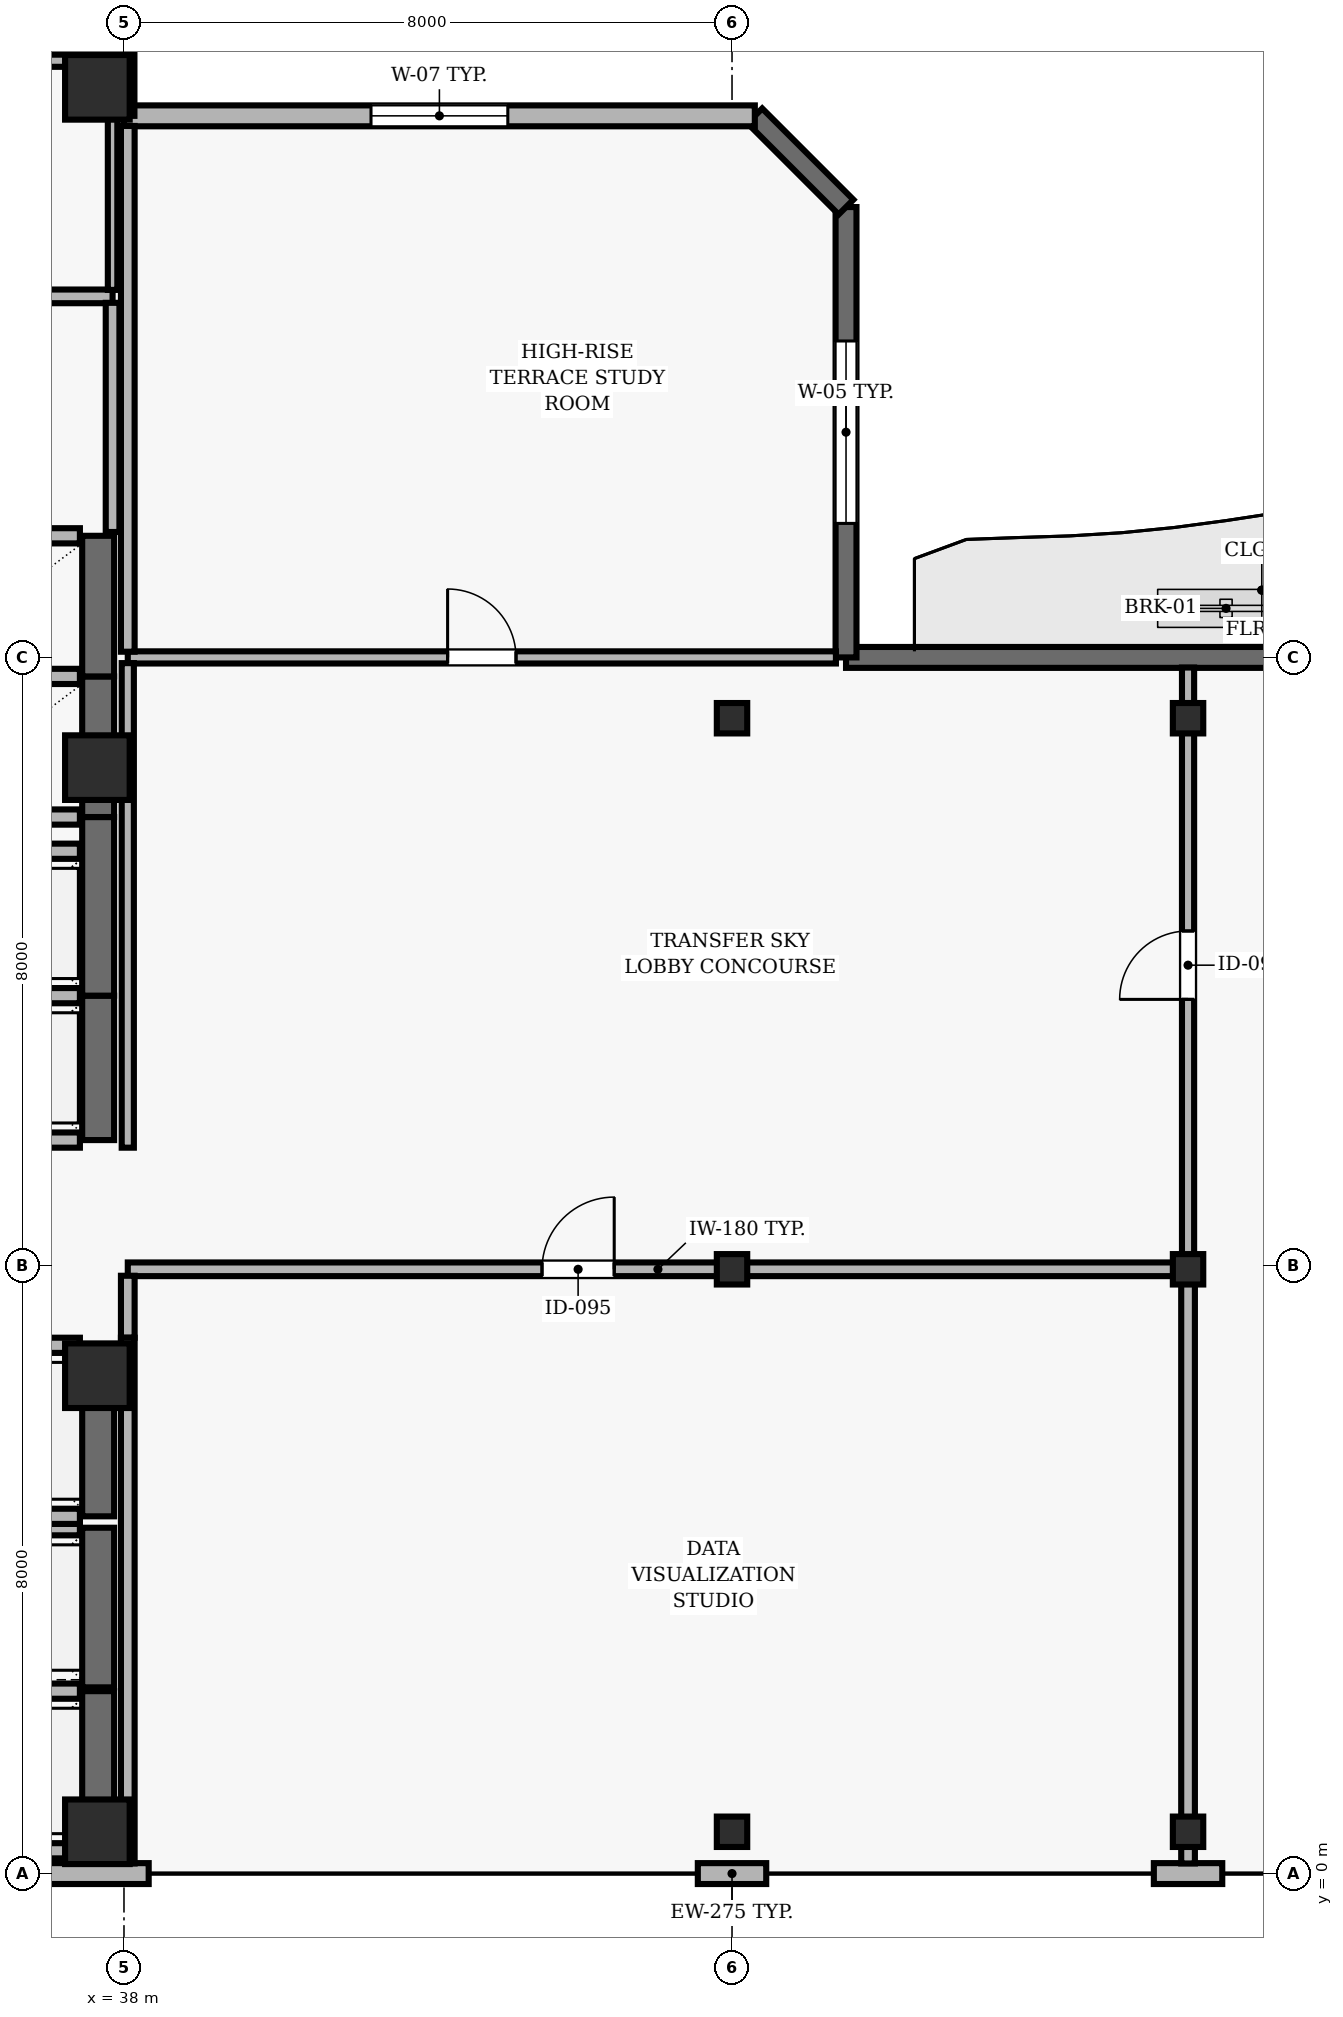
"""IFC4 building model, lengths in metres.
Left out: names, types, materials, properties, quantities, classifications, styles, units other than length and angle.
Written with IfcOpenShell. Run it as: python <this file> out.ifc"""

import sys

from ifc_helpers import new_model, si_unit, direction, frame, frame_2d, origin, origin_2d, place, context, subcontext, project, spatial, rectangle, hollow_rectangle, extrude, element, fill, save


model = new_model("IFC4")
c1 = context("Model", 3, precision=1e-05, world=origin(), true_north=direction((0.0, 1.0)))
c2 = subcontext(c1, "Body", "Model", "MODEL_VIEW")
j1 = project(units=[si_unit("LENGTHUNIT", "METRE"), si_unit("PLANEANGLEUNIT", "RADIAN")], contexts=[c1])
p1 = place(None, origin())
s1 = spatial("IfcSite", under=j1, at=p1, CompositionType="ELEMENT")
p2 = place(p1, origin())
s2 = spatial("IfcBuilding", under=s1, at=p2, CompositionType="ELEMENT")
p3 = place(p2, frame((0.0, 0.0, 243.2)))
s3 = spatial("IfcBuildingStorey", under=s2, at=p3, CompositionType="ELEMENT", Elevation=243.2)
for number, where, z_axis, x_axis in (
    (1, (37.65, 0.55, 0.0), (0.0, 0.0, 1.0), (1.0, 0.0, 0.0)),
    (2, (37.65, 6.55, 0.0), (0.0, 0.0, 1.0), (1.0, 0.0, 0.0)),
    (3, (37.65, 14.55, 0.0), (0.0, 0.0, 1.0), (1.0, 0.0, 0.0)),
    (4, (37.65, 23.5, 0.0), (0.0, 0.0, 1.0), (1.0, 0.0, 0.0)),
):
    element("IfcColumn", number, at=place(p3, frame(where, z_axis=z_axis, x_axis=x_axis)), inside=s3, PredefinedType="COLUMN", context=c2, shape_type="SweptSolid", body=[
        extrude(rectangle(XDim=0.85, YDim=0.85, at=origin_2d()), origin(), (0.0, 0.0, 1.0), 5.0),
    ])
for number, where, z_axis, x_axis in (
    (5, (46.0, 0.55, 0.0), (0.0, 0.0, 1.0), (1.0, 0.0, 0.0)),
    (6, (46.0, 7.95, 0.0), (0.0, 0.0, 1.0), (1.0, 0.0, 0.0)),
    (7, (46.0, 15.2, 0.0), (0.0, 0.0, 1.0), (1.0, 0.0, 0.0)),
    (8, (52.0, 0.55, 0.0), (0.0, 0.0, 1.0), (1.0, 0.0, 0.0)),
    (9, (52.0, 7.95, 0.0), (0.0, 0.0, 1.0), (1.0, 0.0, 0.0)),
    (10, (52.0, 15.2, 0.0), (0.0, 0.0, 1.0), (1.0, 0.0, 0.0)),
):
    element("IfcColumn", number, at=place(p3, frame(where, z_axis=z_axis, x_axis=x_axis)), inside=s3, PredefinedType="COLUMN", context=c2, shape_type="SweptSolid", body=[
        extrude(hollow_rectangle(XDim=0.4, YDim=0.4, WallThickness=0.02, at=origin_2d()), origin(), (0.0, 0.0, 1.0), 5.0),
    ])
p4 = place(p3, frame((36.975, 0.0, 0.0), z_axis=(0.0, 0.0, 1.0), x_axis=(1.0, 0.0, 0.0)))
e11 = element("IfcWall", 11, at=p4, inside=s3, PredefinedType="SOLIDWALL", context=c2, shape_type="SweptSolid", body=[
    extrude(rectangle(XDim=1.35, YDim=0.275, at=frame_2d((0.675, 0.0))), origin(), (0.0, 0.0, 1.0), 4.79),
])
for number, where, z_axis, x_axis in (
    (12, (45.55, 0.0, 0.0), (0.0, 0.0, 1.0), (1.0, 0.0, 0.0)),
    (13, (51.55, 0.0, 0.0), (0.0, 0.0, 1.0), (1.0, 0.0, 0.0)),
):
    element("IfcWall", number, at=place(p3, frame(where, z_axis=z_axis, x_axis=x_axis)), inside=s3, PredefinedType="SOLIDWALL", context=c2, shape_type="SweptSolid", body=[
        extrude(rectangle(XDim=0.9, YDim=0.275, at=frame_2d((0.45, 0.0))), origin(), (0.0, 0.0, 1.0), 4.79),
    ])
p5 = place(p3, frame((57.3, 16.0, 0.0), z_axis=(0.0, 0.0, 1.0), x_axis=(-1.0, 0.0, 0.0)))
e14 = element("IfcWall", 14, at=p5, inside=s3, PredefinedType="SOLIDWALL", context=c2, shape_type="SweptSolid", body=[
    extrude(rectangle(XDim=9.8, YDim=0.275, at=frame_2d((4.9, 0.0))), origin(), (0.0, 0.0, 1.0), 4.79),
])
p6 = place(p5, frame((2.1, 0.0, 0.0)))
e15 = element("IfcOpeningElement", 15, at=p6, cuts=e14, PredefinedType="OPENING", context=c2, shape_type="SweptSolid", body=[
    extrude(rectangle(XDim=1.0, YDim=2.2, at=frame_2d((0.5, 1.1))), frame((0.0, 0.147, 0.0), z_axis=(0.0, -1.0, 0.0), x_axis=(1.0, 0.0, 0.0)), (0.0, 0.0, 1.0), 0.295),
])
p7 = place(p3, frame((47.5, 16.0, 0.0), z_axis=(0.0, 0.0, 1.0), x_axis=(0.0, 1.0, 0.0)))
e16 = element("IfcWall", 16, at=p7, inside=s3, PredefinedType="SOLIDWALL", context=c2, shape_type="SweptSolid", body=[
    extrude(rectangle(XDim=5.925, YDim=0.275, at=frame_2d((2.962, 0.0))), origin(), (0.0, 0.0, 1.0), 4.79),
])
p8 = place(p7, frame((1.763, 0.0, 0.9)))
e17 = element("IfcOpeningElement", 17, at=p8, cuts=e16, PredefinedType="OPENING", context=c2, shape_type="SweptSolid", body=[
    extrude(rectangle(XDim=2.4, YDim=1.6, at=frame_2d((1.2, 0.8))), frame((0.0, 0.147, 0.0), z_axis=(0.0, -1.0, 0.0), x_axis=(1.0, 0.0, 0.0)), (0.0, 0.0, 1.0), 0.295),
])
p9 = place(p3, frame((47.5, 21.925, 0.0), z_axis=(0.0, 0.0, 1.0), x_axis=(-0.707106781187, 0.707106781187, 0.0)))
e18 = element("IfcWall", 18, at=p9, inside=s3, PredefinedType="SOLIDWALL", context=c2, shape_type="SweptSolid", body=[
    extrude(rectangle(XDim=1.697, YDim=0.275, at=frame_2d((0.849, 0.0))), origin(), (0.0, 0.0, 1.0), 4.79),
])
p10 = place(p3, frame((46.3, 23.125, 0.0), z_axis=(0.0, 0.0, 1.0), x_axis=(-1.0, 0.0, 0.0)))
e19 = element("IfcWall", 19, at=p10, inside=s3, PredefinedType="SOLIDWALL", context=c2, shape_type="SweptSolid", body=[
    extrude(rectangle(XDim=8.3, YDim=0.275, at=frame_2d((4.15, 0.0))), origin(), (0.0, 0.0, 1.0), 4.79),
])
p11 = place(p10, frame((3.25, 0.0, 0.9)))
e20 = element("IfcOpeningElement", 20, at=p11, cuts=e19, PredefinedType="OPENING", context=c2, shape_type="SweptSolid", body=[
    extrude(rectangle(XDim=1.8, YDim=1.8, at=frame_2d((0.9, 0.9))), frame((0.0, 0.147, 0.0), z_axis=(0.0, -1.0, 0.0), x_axis=(1.0, 0.0, 0.0)), (0.0, 0.0, 1.0), 0.295),
])
p12 = place(p3, frame((38.0, 23.125, 0.0), z_axis=(0.0, 0.0, 1.0), x_axis=(0.0, 1.0, 0.0)))
e21 = element("IfcWall", 21, at=p12, inside=s3, PredefinedType="SOLIDWALL", context=c2, shape_type="SweptSolid", body=[
    extrude(rectangle(XDim=12.175, YDim=0.275, at=frame_2d((6.087, 0.0))), origin(), (0.0, 0.0, 1.0), 4.79),
])
p13 = place(p12, frame((3.487, 0.0, 0.0)))
e22 = element("IfcOpeningElement", 22, at=p13, cuts=e21, PredefinedType="OPENING", context=c2, shape_type="SweptSolid", body=[
    extrude(rectangle(XDim=1.0, YDim=2.2, at=frame_2d((0.5, 1.1))), frame((0.0, 0.147, 0.0), z_axis=(0.0, -1.0, 0.0), x_axis=(1.0, 0.0, 0.0)), (0.0, 0.0, 1.0), 0.295),
])
p14 = place(p3, frame((37.66, 0.3, 0.0), z_axis=(0.0, 0.0, 1.0), x_axis=(0.0, 1.0, 0.0)))
e23 = element("IfcWall", 23, at=p14, inside=s3, PredefinedType="SHEAR", context=c2, shape_type="SweptSolid", body=[
    extrude(rectangle(XDim=2.1, YDim=0.42, at=frame_2d((1.05, 0.0))), origin(), (0.0, 0.0, 1.0), 4.79),
])
for number, where, z_axis, x_axis in (
    (24, (35.28, 0.3, 0.0), (0.0, 0.0, 1.0), (1.0, 0.0, 0.0)),
    (25, (37.42, 2.4, 0.0), (0.0, 0.0, 1.0), (-1.0, 0.0, 0.0)),
):
    element("IfcWall", number, at=place(p3, frame(where, z_axis=z_axis, x_axis=x_axis)), inside=s3, PredefinedType="SOLIDWALL", context=c2, shape_type="SweptSolid", body=[
        extrude(rectangle(XDim=2.14, YDim=0.2, at=frame_2d((1.07, 0.0))), origin(), (0.0, 0.0, 1.0), 4.79),
    ])
p15 = place(p3, frame((37.66, 2.45, 0.0), z_axis=(0.0, 0.0, 1.0), x_axis=(0.0, 1.0, 0.0)))
e26 = element("IfcWall", 26, at=p15, inside=s3, PredefinedType="SHEAR", context=c2, shape_type="SweptSolid", body=[
    extrude(rectangle(XDim=2.1, YDim=0.42, at=frame_2d((1.05, 0.0))), origin(), (0.0, 0.0, 1.0), 4.79),
])
p16 = place(p3, frame((37.42, 4.55, 0.0), z_axis=(0.0, 0.0, 1.0), x_axis=(-1.0, 0.0, 0.0)))
e27 = element("IfcWall", 27, at=p16, inside=s3, PredefinedType="SOLIDWALL", context=c2, shape_type="SweptSolid", body=[
    extrude(rectangle(XDim=2.14, YDim=0.2, at=frame_2d((1.07, 0.0))), origin(), (0.0, 0.0, 1.0), 4.79),
])
p17 = place(p3, frame((37.66, 4.7, 0.0), z_axis=(0.0, 0.0, 1.0), x_axis=(0.0, 1.0, 0.0)))
e28 = element("IfcWall", 28, at=p17, inside=s3, PredefinedType="SHEAR", context=c2, shape_type="SweptSolid", body=[
    extrude(rectangle(XDim=2.25, YDim=0.42, at=frame_2d((1.125, 0.0))), origin(), (0.0, 0.0, 1.0), 4.79),
])
for number, where, z_axis, x_axis in (
    (29, (35.28, 4.7, 0.0), (0.0, 0.0, 1.0), (1.0, 0.0, 0.0)),
    (30, (37.42, 6.95, 0.0), (0.0, 0.0, 1.0), (-1.0, 0.0, 0.0)),
):
    element("IfcWall", number, at=place(p3, frame(where, z_axis=z_axis, x_axis=x_axis)), inside=s3, PredefinedType="SOLIDWALL", context=c2, shape_type="SweptSolid", body=[
        extrude(rectangle(XDim=2.14, YDim=0.2, at=frame_2d((1.07, 0.0))), origin(), (0.0, 0.0, 1.0), 4.79),
    ])
p18 = place(p3, frame((37.66, 9.65, 0.0), z_axis=(0.0, 0.0, 1.0), x_axis=(0.0, 1.0, 0.0)))
e31 = element("IfcWall", 31, at=p18, inside=s3, PredefinedType="SHEAR", context=c2, shape_type="SweptSolid", body=[
    extrude(rectangle(XDim=1.9, YDim=0.42, at=frame_2d((0.95, 0.0))), origin(), (0.0, 0.0, 1.0), 4.79),
])
for number, where, z_axis, x_axis in (
    (32, (35.28, 9.65, 0.0), (0.0, 0.0, 1.0), (1.0, 0.0, 0.0)),
    (33, (37.42, 11.55, 0.0), (0.0, 0.0, 1.0), (-1.0, 0.0, 0.0)),
):
    element("IfcWall", number, at=place(p3, frame(where, z_axis=z_axis, x_axis=x_axis)), inside=s3, PredefinedType="SOLIDWALL", context=c2, shape_type="SweptSolid", body=[
        extrude(rectangle(XDim=2.14, YDim=0.2, at=frame_2d((1.07, 0.0))), origin(), (0.0, 0.0, 1.0), 4.79),
    ])
p19 = place(p3, frame((37.66, 11.55, 0.0), z_axis=(0.0, 0.0, 1.0), x_axis=(0.0, 1.0, 0.0)))
e34 = element("IfcWall", 34, at=p19, inside=s3, PredefinedType="SHEAR", context=c2, shape_type="SweptSolid", body=[
    extrude(rectangle(XDim=2.35, YDim=0.42, at=frame_2d((1.175, 0.0))), origin(), (0.0, 0.0, 1.0), 4.79),
])
p20 = place(p3, frame((37.42, 13.45, 0.0), z_axis=(0.0, 0.0, 1.0), x_axis=(-1.0, 0.0, 0.0)))
e35 = element("IfcWall", 35, at=p20, inside=s3, PredefinedType="SOLIDWALL", context=c2, shape_type="SweptSolid", body=[
    extrude(rectangle(XDim=2.14, YDim=0.2, at=frame_2d((1.07, 0.0))), origin(), (0.0, 0.0, 1.0), 4.79),
])
p21 = place(p3, frame((37.66, 13.9, 0.0), z_axis=(0.0, 0.0, 1.0), x_axis=(0.0, 1.0, 0.0)))
e36 = element("IfcWall", 36, at=p21, inside=s3, PredefinedType="SHEAR", context=c2, shape_type="SweptSolid", body=[
    extrude(rectangle(XDim=1.85, YDim=0.42, at=frame_2d((0.925, 0.0))), origin(), (0.0, 0.0, 1.0), 4.79),
])
for number, where, z_axis, x_axis in (
    (37, (35.28, 13.9, 0.0), (0.0, 0.0, 1.0), (1.0, 0.0, 0.0)),
    (38, (37.42, 15.75, 0.0), (0.0, 0.0, 1.0), (-1.0, 0.0, 0.0)),
):
    element("IfcWall", number, at=place(p3, frame(where, z_axis=z_axis, x_axis=x_axis)), inside=s3, PredefinedType="SOLIDWALL", context=c2, shape_type="SweptSolid", body=[
        extrude(rectangle(XDim=2.14, YDim=0.2, at=frame_2d((1.07, 0.0))), origin(), (0.0, 0.0, 1.0), 4.79),
    ])
p22 = place(p3, frame((37.66, 15.75, 0.0), z_axis=(0.0, 0.0, 1.0), x_axis=(0.0, 1.0, 0.0)))
e39 = element("IfcWall", 39, at=p22, inside=s3, PredefinedType="SHEAR", context=c2, shape_type="SweptSolid", body=[
    extrude(rectangle(XDim=1.85, YDim=0.42, at=frame_2d((0.925, 0.0))), origin(), (0.0, 0.0, 1.0), 4.79),
])
p23 = place(p3, frame((37.42, 17.6, 0.0), z_axis=(0.0, 0.0, 1.0), x_axis=(-1.0, 0.0, 0.0)))
e40 = element("IfcWall", 40, at=p23, inside=s3, PredefinedType="SOLIDWALL", context=c2, shape_type="SweptSolid", body=[
    extrude(rectangle(XDim=2.14, YDim=0.2, at=frame_2d((1.07, 0.0))), origin(), (0.0, 0.0, 1.0), 4.79),
])
p24 = place(p3, frame((37.85, 20.75, 0.0), z_axis=(0.0, 0.0, 1.0), x_axis=(-1.0, 0.0, 0.0)))
e41 = element("IfcWall", 41, at=p24, inside=s3, PredefinedType="PARTITIONING", context=c2, shape_type="SweptSolid", body=[
    extrude(rectangle(XDim=4.0, YDim=0.18, at=frame_2d((2.0, 0.0))), origin(), (0.0, 0.0, 1.0), 4.79),
])
p25 = place(p3, frame((37.85, 23.85, 0.0), z_axis=(0.0, 0.0, 1.0), x_axis=(-1.0, 0.0, 0.0)))
e42 = element("IfcWall", 42, at=p25, inside=s3, PredefinedType="PARTITIONING", context=c2, shape_type="SweptSolid", body=[
    extrude(rectangle(XDim=4.0, YDim=0.16, at=frame_2d((2.0, 0.0))), origin(), (0.0, 0.0, 1.0), 4.327),
])
p26 = place(p25, frame((1.9, 0.0, 0.0)))
e43 = element("IfcOpeningElement", 43, at=p26, cuts=e42, PredefinedType="OPENING", context=c2, shape_type="SweptSolid", body=[
    extrude(rectangle(XDim=0.9, YDim=2.1, at=frame_2d((0.45, 1.05))), frame((0.0, 0.09, 0.0), z_axis=(0.0, -1.0, 0.0), x_axis=(1.0, 0.0, 0.0)), (0.0, 0.0, 1.0), 0.18),
])
p27 = place(p3, frame((38.05, 7.95, 0.0), z_axis=(0.0, 0.0, 1.0), x_axis=(1.0, 0.0, 0.0)))
e44 = element("IfcWall", 44, at=p27, inside=s3, PredefinedType="PARTITIONING", context=c2, shape_type="SweptSolid", body=[
    extrude(rectangle(XDim=13.95, YDim=0.18, at=frame_2d((6.975, 0.0))), origin(), (0.0, 0.0, 1.0), 4.327),
])
p28 = place(p27, frame((5.45, 0.0, 0.0)))
e45 = element("IfcOpeningElement", 45, at=p28, cuts=e44, PredefinedType="OPENING", context=c2, shape_type="SweptSolid", body=[
    extrude(rectangle(XDim=0.95, YDim=2.1, at=frame_2d((0.475, 1.05))), frame((0.0, 0.1, 0.0), z_axis=(0.0, -1.0, 0.0), x_axis=(1.0, 0.0, 0.0)), (0.0, 0.0, 1.0), 0.2),
])
p29 = place(p3, frame((38.05, 16.0, 0.0), z_axis=(0.0, 0.0, 1.0), x_axis=(1.0, 0.0, 0.0)))
e46 = element("IfcWall", 46, at=p29, inside=s3, PredefinedType="PARTITIONING", context=c2, shape_type="SweptSolid", body=[
    extrude(rectangle(XDim=9.317, YDim=0.16, at=frame_2d((4.658, 0.0))), origin(), (0.0, 0.0, 1.0), 4.49),
])
p30 = place(p29, frame((4.208, 0.0, 0.0)))
e47 = element("IfcOpeningElement", 47, at=p30, cuts=e46, PredefinedType="OPENING", context=c2, shape_type="SweptSolid", body=[
    extrude(rectangle(XDim=0.9, YDim=2.1, at=frame_2d((0.45, 1.05))), frame((0.0, 0.09, 0.0), z_axis=(0.0, -1.0, 0.0), x_axis=(1.0, 0.0, 0.0)), (0.0, 0.0, 1.0), 0.18),
])
p31 = place(p3, frame((37.85, 17.65, 0.0), z_axis=(0.0, 0.0, 1.0), x_axis=(0.0, 1.0, 0.0)))
e48 = element("IfcWall", 48, at=p31, inside=s3, PredefinedType="PARTITIONING", context=c2, shape_type="SweptSolid", body=[
    extrude(rectangle(XDim=3.015, YDim=0.18, at=frame_2d((1.508, 0.0))), origin(), (0.0, 0.0, 1.0), 4.327),
])
p32 = place(p3, frame((37.85, 20.835, 0.0), z_axis=(0.0, 0.0, 1.0), x_axis=(0.0, 1.0, 0.0)))
e49 = element("IfcWall", 49, at=p32, inside=s3, PredefinedType="PARTITIONING", context=c2, shape_type="SweptSolid", body=[
    extrude(rectangle(XDim=2.29, YDim=0.125, at=frame_2d((1.145, 0.0))), origin(), (0.0, 0.0, 1.0), 4.327),
])
p33 = place(p3, frame((38.05, 7.05, 0.0), z_axis=(0.0, 0.0, 1.0), x_axis=(0.0, 1.0, 0.0)))
e50 = element("IfcWall", 50, at=p33, inside=s3, PredefinedType="PARTITIONING", context=c2, shape_type="SweptSolid", body=[
    extrude(rectangle(XDim=0.815, YDim=0.18, at=frame_2d((0.407, 0.0))), origin(), (0.0, 0.0, 1.0), 4.327),
])
p34 = place(p3, frame((38.05, 7.05, 0.0), z_axis=(0.0, 0.0, 1.0), x_axis=(0.0, -1.0, 0.0)))
e51 = element("IfcWall", 51, at=p34, inside=s3, PredefinedType="PARTITIONING", context=c2, shape_type="SweptSolid", body=[
    extrude(rectangle(XDim=6.917, YDim=0.18, at=frame_2d((3.458, 0.0))), origin(), (0.0, 0.0, 1.0), 4.327),
])
p35 = place(p3, frame((38.05, 15.925, 0.0), z_axis=(0.0, 0.0, 1.0), x_axis=(0.0, -1.0, 0.0)))
e52 = element("IfcWall", 52, at=p35, inside=s3, PredefinedType="PARTITIONING", context=c2, shape_type="SweptSolid", body=[
    extrude(rectangle(XDim=6.375, YDim=0.16, at=frame_2d((3.188, 0.0))), origin(), (0.0, 0.0, 1.0), 4.327),
])
p36 = place(p3, frame((38.05, 22.992, 0.0), z_axis=(0.0, 0.0, 1.0), x_axis=(0.0, -1.0, 0.0)))
e53 = element("IfcWall", 53, at=p36, inside=s3, PredefinedType="PARTITIONING", context=c2, shape_type="SweptSolid", body=[
    extrude(rectangle(XDim=6.917, YDim=0.18, at=frame_2d((3.458, 0.0))), origin(), (0.0, 0.0, 1.0), 4.327),
])
p37 = place(p3, frame((52.0, 7.865, 0.0), z_axis=(0.0, 0.0, 1.0), x_axis=(0.0, -1.0, 0.0)))
e54 = element("IfcWall", 54, at=p37, inside=s3, PredefinedType="PARTITIONING", context=c2, shape_type="SweptSolid", body=[
    extrude(rectangle(XDim=7.732, YDim=0.18, at=frame_2d((3.866, 0.0))), origin(), (0.0, 0.0, 1.0), 4.327),
])
p38 = place(p3, frame((52.0, 8.035, 0.0), z_axis=(0.0, 0.0, 1.0), x_axis=(0.0, 1.0, 0.0)))
e55 = element("IfcWall", 55, at=p38, inside=s3, PredefinedType="PARTITIONING", context=c2, shape_type="SweptSolid", body=[
    extrude(rectangle(XDim=7.832, YDim=0.16, at=frame_2d((3.916, 0.0))), origin(), (0.0, 0.0, 1.0), 4.327),
])
p39 = place(p38, frame((3.466, 0.0, 0.0)))
e56 = element("IfcOpeningElement", 56, at=p39, cuts=e55, PredefinedType="OPENING", context=c2, shape_type="SweptSolid", body=[
    extrude(rectangle(XDim=0.9, YDim=2.1, at=frame_2d((0.45, 1.05))), frame((0.0, 0.09, 0.0), z_axis=(0.0, -1.0, 0.0), x_axis=(1.0, 0.0, 0.0)), (0.0, 0.0, 1.0), 0.18),
])
p40 = place(p8, origin())
e57 = element("IfcWindow", 57, at=p40, inside=s3, PartitioningType="SINGLE_PANEL", PredefinedType="WINDOW", context=c2, shape_type="SweptSolid", body=[
    extrude(rectangle(XDim=2.4, YDim=1.6, at=frame_2d((1.2, 0.8))), frame((0.0, 0.03, 0.0), z_axis=(0.0, -1.0, 0.0), x_axis=(1.0, 0.0, 0.0)), (0.0, 0.0, 1.0), 0.06),
])
fill(e17, e57)
p41 = place(p11, origin())
e58 = element("IfcWindow", 58, at=p41, inside=s3, PartitioningType="SINGLE_PANEL", PredefinedType="WINDOW", context=c2, shape_type="SweptSolid", body=[
    extrude(rectangle(XDim=1.8, YDim=1.8, at=frame_2d((0.9, 0.9))), frame((0.0, 0.03, 0.0), z_axis=(0.0, -1.0, 0.0), x_axis=(1.0, 0.0, 0.0)), (0.0, 0.0, 1.0), 0.06),
])
fill(e20, e58)
p42 = place(p39, origin())
e59 = element("IfcDoor", 59, at=p42, inside=s3, OperationType="SINGLE_SWING_LEFT", PredefinedType="DOOR", context=c2, shape_type="SweptSolid", body=[
    extrude(rectangle(XDim=0.9, YDim=2.1, at=frame_2d((0.45, 1.05))), frame((0.0, 0.025, 0.0), z_axis=(0.0, -1.0, 0.0), x_axis=(1.0, 0.0, 0.0)), (0.0, 0.0, 1.0), 0.05),
])
fill(e56, e59)
p43 = place(p28, origin())
e60 = element("IfcDoor", 60, at=p43, inside=s3, OperationType="SINGLE_SWING_RIGHT", PredefinedType="DOOR", context=c2, shape_type="SweptSolid", body=[
    extrude(rectangle(XDim=0.95, YDim=2.1, at=frame_2d((0.475, 1.05))), frame((0.0, 0.025, 0.0), z_axis=(0.0, -1.0, 0.0), x_axis=(1.0, 0.0, 0.0)), (0.0, 0.0, 1.0), 0.05),
])
fill(e45, e60)
p44 = place(p30, origin())
e61 = element("IfcDoor", 61, at=p44, inside=s3, OperationType="SINGLE_SWING_LEFT", PredefinedType="DOOR", context=c2, shape_type="SweptSolid", body=[
    extrude(rectangle(XDim=0.9, YDim=2.1, at=frame_2d((0.45, 1.05))), frame((0.0, 0.025, 0.0), z_axis=(0.0, -1.0, 0.0), x_axis=(1.0, 0.0, 0.0)), (0.0, 0.0, 1.0), 0.05),
])
fill(e47, e61)
save(model, sys.argv[1])
